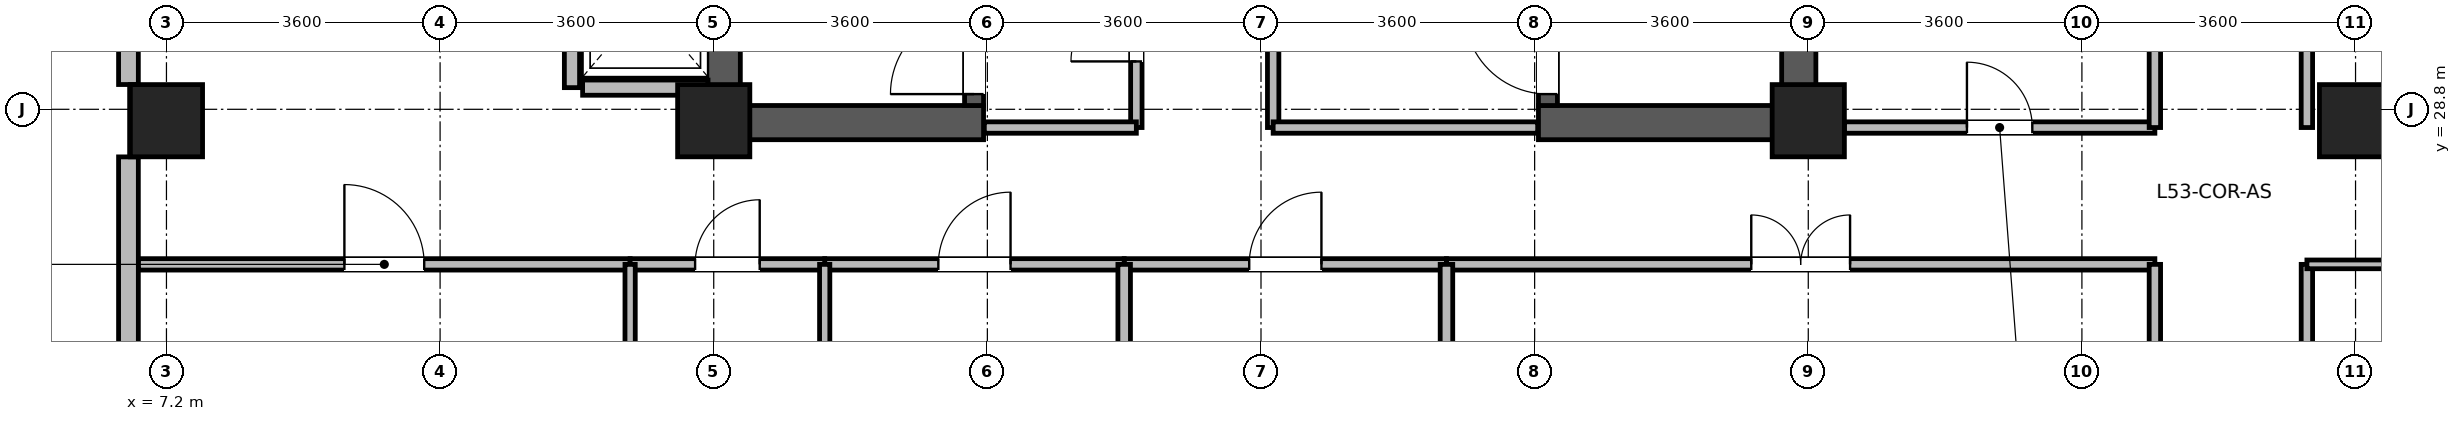
"""IFC4 building model, lengths in metres.
Left out: names, types, materials, properties, quantities, classifications, styles, units other than length and angle.
Written with IfcOpenShell. Run it as: python <this file> out.ifc"""

import sys

from ifc_helpers import new_model, si_unit, direction, frame, frame_2d, origin, origin_2d, place, context, subcontext, project, spatial, rectangle, extrude, source, transform, mapped, element, fill, save


model = new_model("IFC4")
c1 = context("Model", 3, precision=1e-05, world=origin(), true_north=direction((0.0, 1.0)))
c2 = subcontext(c1, "Body", "Model", "MODEL_VIEW")
j1 = project(units=[si_unit("LENGTHUNIT", "METRE"), si_unit("PLANEANGLEUNIT", "RADIAN")], contexts=[c1])
p1 = place(None, origin())
s1 = spatial("IfcSite", under=j1, at=p1, CompositionType="ELEMENT")
p2 = place(p1, origin())
s2 = spatial("IfcBuilding", under=s1, at=p2, CompositionType="ELEMENT")
p3 = place(p2, frame((0.0, 0.0, 209.2)))
s3 = spatial("IfcBuildingStorey", under=s2, at=p3, CompositionType="ELEMENT", Elevation=209.2)
for number, where, z_axis, x_axis in (
    (1, (14.525, 28.4, 0.0), (0.0, 0.0, 1.0), (0.0, 1.0, 0.0)),
    (2, (28.675, 28.4, 0.0), (0.0, 0.0, 1.0), (0.0, 1.0, 0.0)),
):
    element("IfcWall", number, at=place(p3, frame(where, z_axis=z_axis, x_axis=x_axis)), inside=s3, PredefinedType="SHEAR", context=c2, shape_type="SweptSolid", body=[
        extrude(rectangle(XDim=7.9, YDim=0.45, at=frame_2d((3.95, 0.0))), origin(), (0.0, 0.0, 1.0), 3.47),
    ])
for number, where, z_axis, x_axis in (
    (3, (14.75, 28.625, 0.0), (0.0, 0.0, 1.0), (1.0, 0.0, 0.0)),
    (4, (25.25, 28.625, 0.0), (0.0, 0.0, 1.0), (1.0, 0.0, 0.0)),
):
    element("IfcWall", number, at=place(p3, frame(where, z_axis=z_axis, x_axis=x_axis)), inside=s3, PredefinedType="SHEAR", context=c2, shape_type="SweptSolid", body=[
        extrude(rectangle(XDim=3.2, YDim=0.45, at=frame_2d((1.6, 0.0))), origin(), (0.0, 0.0, 1.0), 3.47),
    ])
p4 = place(p3, frame((17.825, 28.85, 0.0), z_axis=(0.0, 0.0, 1.0), x_axis=(0.0, 1.0, 0.0)))
e5 = element("IfcWall", 5, at=p4, inside=s3, PredefinedType="SHEAR", context=c2, shape_type="SweptSolid", body=[
    extrude(rectangle(XDim=7.0, YDim=0.25, at=frame_2d((3.5, 0.0))), origin(), (0.0, 0.0, 1.0), 3.47),
])
p5 = place(p4, frame((0.15, 0.0, 0.0)))
e6 = element("IfcOpeningElement", 6, at=p5, cuts=e5, PredefinedType="OPENING", context=c2, shape_type="SweptSolid", body=[
    extrude(rectangle(XDim=1.1, YDim=2.08, at=frame_2d((0.55, 1.04))), frame((0.0, 0.135, 0.0), z_axis=(0.0, -1.0, 0.0), x_axis=(1.0, 0.0, 0.0)), (0.0, 0.0, 1.0), 0.27),
])
p6 = place(p3, frame((25.375, 28.85, 0.0), z_axis=(0.0, 0.0, 1.0), x_axis=(0.0, 1.0, 0.0)))
e7 = element("IfcWall", 7, at=p6, inside=s3, PredefinedType="SHEAR", context=c2, shape_type="SweptSolid", body=[
    extrude(rectangle(XDim=7.0, YDim=0.25, at=frame_2d((3.5, 0.0))), origin(), (0.0, 0.0, 1.0), 3.47),
])
p7 = place(p6, frame((0.15, 0.0, 0.0)))
e8 = element("IfcOpeningElement", 8, at=p7, cuts=e7, PredefinedType="OPENING", context=c2, shape_type="SweptSolid", body=[
    extrude(rectangle(XDim=1.1, YDim=2.08, at=frame_2d((0.55, 1.04))), frame((0.0, 0.135, 0.0), z_axis=(0.0, -1.0, 0.0), x_axis=(1.0, 0.0, 0.0)), (0.0, 0.0, 1.0), 0.27),
])
m1 = source(origin(), c2, "Body", "SweptSolid", [
    extrude(rectangle(XDim=0.95, YDim=0.95, at=origin_2d()), origin(), (0.0, 0.0, 1.0), 3.7),
])
for number, where, z_axis, x_axis in (
    (9, (7.2, 28.65, 0.0), (0.0, 0.0, 1.0), (1.0, 0.0, 0.0)),
    (10, (14.4, 28.65, 0.0), (0.0, 0.0, 1.0), (1.0, 0.0, 0.0)),
    (11, (28.8, 28.65, 0.0), (0.0, 0.0, 1.0), (1.0, 0.0, 0.0)),
    (12, (36.0, 28.65, 0.0), (0.0, 0.0, 1.0), (1.0, 0.0, 0.0)),
):
    element("IfcColumn", number, at=place(p3, frame(where, z_axis=z_axis, x_axis=x_axis)), inside=s3, PredefinedType="COLUMN", context=c2, shape_type="MappedRepresentation", body=[
        mapped(m1, transform((0.0, 0.0, 0.0), x_axis=(1.0, 0.0, 0.0), y_axis=(0.0, 1.0, 0.0), z_axis=(0.0, 0.0, 1.0), scale=1.0)),
    ])
p8 = place(p3, frame((6.7, 29.126, 0.0), z_axis=(0.0, 0.0, 1.0), x_axis=(0.0, 1.0, 0.0)))
e13 = element("IfcWall", 13, at=p8, inside=s3, PredefinedType="STANDARD", context=c2, shape_type="SweptSolid", body=[
    extrude(rectangle(XDim=6.548, YDim=0.26, at=frame_2d((3.274, 0.0))), origin(), (0.0, 0.0, 1.0), 3.45),
])
p9 = place(p8, frame((0.737, 0.0, 0.85)))
e14 = element("IfcOpeningElement", 14, at=p9, cuts=e13, PredefinedType="OPENING", context=c2, shape_type="SweptSolid", body=[
    extrude(rectangle(XDim=1.8, YDim=1.85, at=frame_2d((0.9, 0.925))), frame((0.0, 0.14, 0.0), z_axis=(0.0, -1.0, 0.0), x_axis=(1.0, 0.0, 0.0)), (0.0, 0.0, 1.0), 0.28),
])
p10 = place(p8, frame((4.011, 0.0, 0.85)))
e15 = element("IfcOpeningElement", 15, at=p10, cuts=e13, PredefinedType="OPENING", context=c2, shape_type="SweptSolid", body=[
    extrude(rectangle(XDim=1.8, YDim=1.85, at=frame_2d((0.9, 0.925))), frame((0.0, 0.14, 0.0), z_axis=(0.0, -1.0, 0.0), x_axis=(1.0, 0.0, 0.0)), (0.0, 0.0, 1.0), 0.28),
])
p11 = place(p3, frame((6.7, 21.47, 0.0), z_axis=(0.0, 0.0, 1.0), x_axis=(0.0, 1.0, 0.0)))
e16 = element("IfcWall", 16, at=p11, inside=s3, PredefinedType="STANDARD", context=c2, shape_type="SweptSolid", body=[
    extrude(rectangle(XDim=6.704, YDim=0.26, at=frame_2d((3.352, 0.0))), origin(), (0.0, 0.0, 1.0), 3.45),
])
p12 = place(p11, frame((0.776, 0.0, 0.85)))
e17 = element("IfcOpeningElement", 17, at=p12, cuts=e16, PredefinedType="OPENING", context=c2, shape_type="SweptSolid", body=[
    extrude(rectangle(XDim=1.8, YDim=1.85, at=frame_2d((0.9, 0.925))), frame((0.0, 0.14, 0.0), z_axis=(0.0, -1.0, 0.0), x_axis=(1.0, 0.0, 0.0)), (0.0, 0.0, 1.0), 0.28),
])
p13 = place(p11, frame((2.877, 0.0, 0.85)))
e18 = element("IfcOpeningElement", 18, at=p13, cuts=e16, PredefinedType="OPENING", context=c2, shape_type="SweptSolid", body=[
    extrude(rectangle(XDim=0.95, YDim=1.75, at=frame_2d((0.475, 0.875))), frame((0.0, 0.14, 0.0), z_axis=(0.0, -1.0, 0.0), x_axis=(1.0, 0.0, 0.0)), (0.0, 0.0, 1.0), 0.28),
])
p14 = place(p3, frame((12.675, 29.085, 0.0), z_axis=(0.0, 0.0, 1.0), x_axis=(1.0, 0.0, 0.0)))
e19 = element("IfcWall", 19, at=p14, inside=s3, PredefinedType="PARTITIONING", context=c2, shape_type="SweptSolid", body=[
    extrude(rectangle(XDim=1.65, YDim=0.2, at=frame_2d((0.825, 0.0))), origin(), (0.0, 0.0, 1.0), 3.45),
])
p15 = place(p3, frame((12.535, 29.085, 0.0), z_axis=(0.0, 0.0, 1.0), x_axis=(0.0, 1.0, 0.0)))
e20 = element("IfcWall", 20, at=p15, inside=s3, PredefinedType="PARTITIONING", context=c2, shape_type="SweptSolid", body=[
    extrude(rectangle(XDim=2.23, YDim=0.2, at=frame_2d((1.115, 0.0))), origin(), (0.0, 0.0, 1.0), 3.45),
])
p16 = place(p3, frame((35.36, 16.96, 0.0), z_axis=(0.0, 0.0, 1.0), x_axis=(0.0, 1.0, 0.0)))
e21 = element("IfcWall", 21, at=p16, inside=s3, PredefinedType="PARTITIONING", context=c2, shape_type="SweptSolid", body=[
    extrude(rectangle(XDim=9.8, YDim=0.15, at=frame_2d((4.9, 0.0))), origin(), (0.0, 0.0, 1.0), 3.45),
])
p17 = place(p16, frame((2.486, 0.0, 0.0)))
e22 = element("IfcOpeningElement", 22, at=p17, cuts=e21, PredefinedType="OPENING", context=c2, shape_type="SweptSolid", body=[
    extrude(rectangle(XDim=1.3, YDim=2.12, at=frame_2d((0.65, 1.06))), frame((0.0, 0.085, 0.0), z_axis=(0.0, -1.0, 0.0), x_axis=(1.0, 0.0, 0.0)), (0.0, 0.0, 1.0), 0.17),
])
p18 = place(p3, frame((24.04, 26.76, 0.0), z_axis=(0.0, 0.0, 1.0), x_axis=(1.0, 0.0, 0.0)))
e23 = element("IfcWall", 23, at=p18, inside=s3, PredefinedType="PARTITIONING", context=c2, shape_type="SweptSolid", body=[
    extrude(rectangle(XDim=9.32, YDim=0.15, at=frame_2d((4.66, 0.0))), origin(), (0.0, 0.0, 1.0), 3.45),
])
p19 = place(p18, frame((4.01, 0.0, 0.0)))
e24 = element("IfcOpeningElement", 24, at=p19, cuts=e23, PredefinedType="OPENING", context=c2, shape_type="SweptSolid", body=[
    extrude(rectangle(XDim=1.3, YDim=2.12, at=frame_2d((0.65, 1.06))), frame((0.0, 0.085, 0.0), z_axis=(0.0, -1.0, 0.0), x_axis=(1.0, 0.0, 0.0)), (0.0, 0.0, 1.0), 0.17),
])
p20 = place(p3, frame((35.36, 28.56, 0.0), z_axis=(0.0, 0.0, 1.0), x_axis=(0.0, 1.0, 0.0)))
e25 = element("IfcWall", 25, at=p20, inside=s3, PredefinedType="PARTITIONING", context=c2, shape_type="SweptSolid", body=[
    extrude(rectangle(XDim=7.68, YDim=0.15, at=frame_2d((3.84, 0.0))), origin(), (0.0, 0.0, 1.0), 3.45),
])
p21 = place(p20, frame((3.19, 0.0, 0.0)))
e26 = element("IfcOpeningElement", 26, at=p21, cuts=e25, PredefinedType="OPENING", context=c2, shape_type="SweptSolid", body=[
    extrude(rectangle(XDim=1.3, YDim=2.12, at=frame_2d((0.65, 1.06))), frame((0.0, 0.085, 0.0), z_axis=(0.0, -1.0, 0.0), x_axis=(1.0, 0.0, 0.0)), (0.0, 0.0, 1.0), 0.17),
])
p22 = place(p3, frame((6.832, 26.76, 0.0), z_axis=(0.0, 0.0, 1.0), x_axis=(1.0, 0.0, 0.0)))
e27 = element("IfcWall", 27, at=p22, inside=s3, PredefinedType="PARTITIONING", context=c2, shape_type="SweptSolid", body=[
    extrude(rectangle(XDim=6.468, YDim=0.15, at=frame_2d((3.234, 0.0))), origin(), (0.0, 0.0, 1.0), 3.45),
])
p23 = place(p22, frame((2.709, 0.0, 0.0)))
e28 = element("IfcOpeningElement", 28, at=p23, cuts=e27, PredefinedType="OPENING", context=c2, shape_type="SweptSolid", body=[
    extrude(rectangle(XDim=1.05, YDim=2.12, at=frame_2d((0.525, 1.06))), frame((0.0, 0.085, 0.0), z_axis=(0.0, -1.0, 0.0), x_axis=(1.0, 0.0, 0.0)), (0.0, 0.0, 1.0), 0.17),
])
p24 = place(p3, frame((33.36, 21.6, 0.0), z_axis=(0.0, 0.0, 1.0), x_axis=(0.0, 1.0, 0.0)))
e29 = element("IfcWall", 29, at=p24, inside=s3, PredefinedType="PARTITIONING", context=c2, shape_type="SweptSolid", body=[
    extrude(rectangle(XDim=5.16, YDim=0.15, at=frame_2d((2.58, 0.0))), origin(), (0.0, 0.0, 1.0), 3.45),
])
p25 = place(p3, frame((29.275, 28.56, 0.0), z_axis=(0.0, 0.0, 1.0), x_axis=(1.0, 0.0, 0.0)))
e30 = element("IfcWall", 30, at=p25, inside=s3, PredefinedType="PARTITIONING", context=c2, shape_type="SweptSolid", body=[
    extrude(rectangle(XDim=4.085, YDim=0.15, at=frame_2d((2.042, 0.0))), origin(), (0.0, 0.0, 1.0), 2.85),
])
p26 = place(p25, frame((1.613, 0.0, 0.0)))
e31 = element("IfcOpeningElement", 31, at=p26, cuts=e30, PredefinedType="OPENING", context=c2, shape_type="SweptSolid", body=[
    extrude(rectangle(XDim=0.86, YDim=2.02, at=frame_2d((0.43, 1.01))), frame((0.0, 0.085, 0.0), z_axis=(0.0, -1.0, 0.0), x_axis=(1.0, 0.0, 0.0)), (0.0, 0.0, 1.0), 0.17),
])
p27 = place(p3, frame((19.8, 26.76, 0.0), z_axis=(0.0, 0.0, 1.0), x_axis=(1.0, 0.0, 0.0)))
e32 = element("IfcWall", 32, at=p27, inside=s3, PredefinedType="PARTITIONING", context=c2, shape_type="SweptSolid", body=[
    extrude(rectangle(XDim=4.24, YDim=0.15, at=frame_2d((2.12, 0.0))), origin(), (0.0, 0.0, 1.0), 3.45),
])
p28 = place(p27, frame((1.645, 0.0, 0.0)))
e33 = element("IfcOpeningElement", 33, at=p28, cuts=e32, PredefinedType="OPENING", context=c2, shape_type="SweptSolid", body=[
    extrude(rectangle(XDim=0.95, YDim=2.1, at=frame_2d((0.475, 1.05))), frame((0.0, 0.085, 0.0), z_axis=(0.0, -1.0, 0.0), x_axis=(1.0, 0.0, 0.0)), (0.0, 0.0, 1.0), 0.17),
])
p29 = place(p3, frame((15.86, 26.76, 0.0), z_axis=(0.0, 0.0, 1.0), x_axis=(1.0, 0.0, 0.0)))
e34 = element("IfcWall", 34, at=p29, inside=s3, PredefinedType="PARTITIONING", context=c2, shape_type="SweptSolid", body=[
    extrude(rectangle(XDim=3.94, YDim=0.15, at=frame_2d((1.97, 0.0))), origin(), (0.0, 0.0, 1.0), 3.45),
])
p30 = place(p29, frame((1.495, 0.0, 0.0)))
e35 = element("IfcOpeningElement", 35, at=p30, cuts=e34, PredefinedType="OPENING", context=c2, shape_type="SweptSolid", body=[
    extrude(rectangle(XDim=0.95, YDim=2.1, at=frame_2d((0.475, 1.05))), frame((0.0, 0.085, 0.0), z_axis=(0.0, -1.0, 0.0), x_axis=(1.0, 0.0, 0.0)), (0.0, 0.0, 1.0), 0.17),
])
p31 = place(p3, frame((33.36, 28.56, 0.0), z_axis=(0.0, 0.0, 1.0), x_axis=(0.0, 1.0, 0.0)))
e36 = element("IfcWall", 36, at=p31, inside=s3, PredefinedType="PARTITIONING", context=c2, shape_type="SweptSolid", body=[
    extrude(rectangle(XDim=3.84, YDim=0.15, at=frame_2d((1.92, 0.0))), origin(), (0.0, 0.0, 1.0), 3.45),
])
p32 = place(p3, frame((19.96, 28.56, 0.0), z_axis=(0.0, 0.0, 1.0), x_axis=(0.0, 1.0, 0.0)))
e37 = element("IfcWall", 37, at=p32, inside=s3, PredefinedType="PARTITIONING", context=c2, shape_type="SweptSolid", body=[
    extrude(rectangle(XDim=2.6, YDim=0.15, at=frame_2d((1.3, 0.0))), origin(), (0.0, 0.0, 1.0), 3.45),
])
p33 = place(p32, frame((0.87, 0.0, 0.0)))
e38 = element("IfcOpeningElement", 38, at=p33, cuts=e37, PredefinedType="OPENING", context=c2, shape_type="SweptSolid", body=[
    extrude(rectangle(XDim=0.86, YDim=2.02, at=frame_2d((0.43, 1.01))), frame((0.0, 0.085, 0.0), z_axis=(0.0, -1.0, 0.0), x_axis=(1.0, 0.0, 0.0)), (0.0, 0.0, 1.0), 0.17),
])
p34 = place(p3, frame((13.3, 26.76, 0.0), z_axis=(0.0, 0.0, 1.0), x_axis=(1.0, 0.0, 0.0)))
e39 = element("IfcWall", 39, at=p34, inside=s3, PredefinedType="PARTITIONING", context=c2, shape_type="SweptSolid", body=[
    extrude(rectangle(XDim=2.56, YDim=0.15, at=frame_2d((1.28, 0.0))), origin(), (0.0, 0.0, 1.0), 3.45),
])
p35 = place(p34, frame((0.855, 0.0, 0.0)))
e40 = element("IfcOpeningElement", 40, at=p35, cuts=e39, PredefinedType="OPENING", context=c2, shape_type="SweptSolid", body=[
    extrude(rectangle(XDim=0.85, YDim=2.04, at=frame_2d((0.425, 1.02))), frame((0.0, 0.085, 0.0), z_axis=(0.0, -1.0, 0.0), x_axis=(1.0, 0.0, 0.0)), (0.0, 0.0, 1.0), 0.17),
])
p36 = place(p3, frame((17.96, 28.56, 0.0), z_axis=(0.0, 0.0, 1.0), x_axis=(1.0, 0.0, 0.0)))
e41 = element("IfcWall", 41, at=p36, inside=s3, PredefinedType="PARTITIONING", context=c2, shape_type="SweptSolid", body=[
    extrude(rectangle(XDim=2.0, YDim=0.15, at=frame_2d((1.0, 0.0))), origin(), (0.0, 0.0, 1.0), 2.45),
])
p37 = place(p3, frame((35.36, 26.76, 0.0), z_axis=(0.0, 0.0, 1.0), x_axis=(1.0, 0.0, 0.0)))
e42 = element("IfcWall", 42, at=p37, inside=s3, PredefinedType="PARTITIONING", context=c2, shape_type="SweptSolid", body=[
    extrude(rectangle(XDim=9.16, YDim=0.115, at=frame_2d((4.58, 0.0))), origin(), (0.0, 0.0, 1.0), 3.45),
])
p38 = place(p3, frame((15.86, 21.732, 0.0), z_axis=(0.0, 0.0, 1.0), x_axis=(0.0, 1.0, 0.0)))
e43 = element("IfcWall", 43, at=p38, inside=s3, PredefinedType="PARTITIONING", context=c2, shape_type="SweptSolid", body=[
    extrude(rectangle(XDim=5.028, YDim=0.135, at=frame_2d((2.514, 0.0))), origin(), (0.0, 0.0, 1.0), 3.45),
])
for number, where, z_axis, x_axis in (
    (44, (19.8, 21.732, 0.0), (0.0, 0.0, 1.0), (0.0, 1.0, 0.0)),
    (45, (24.04, 21.732, 0.0), (0.0, 0.0, 1.0), (0.0, 1.0, 0.0)),
):
    element("IfcWall", number, at=place(p3, frame(where, z_axis=z_axis, x_axis=x_axis)), inside=s3, PredefinedType="PARTITIONING", context=c2, shape_type="SweptSolid", body=[
        extrude(rectangle(XDim=5.028, YDim=0.165, at=frame_2d((2.514, 0.0))), origin(), (0.0, 0.0, 1.0), 3.45),
    ])
p39 = place(p3, frame((21.76, 28.56, 0.0), z_axis=(0.0, 0.0, 1.0), x_axis=(0.0, 1.0, 0.0)))
e46 = element("IfcWall", 46, at=p39, inside=s3, PredefinedType="PARTITIONING", context=c2, shape_type="SweptSolid", body=[
    extrude(rectangle(XDim=4.6, YDim=0.15, at=frame_2d((2.3, 0.0))), origin(), (0.0, 0.0, 1.0), 3.45),
])
p40 = place(p39, frame((1.55, 0.0, 0.0)))
e47 = element("IfcOpeningElement", 47, at=p40, cuts=e46, PredefinedType="OPENING", context=c2, shape_type="SweptSolid", body=[
    extrude(rectangle(XDim=1.5, YDim=2.1, at=frame_2d((0.75, 1.05))), frame((0.0, 0.085, 0.0), z_axis=(0.0, -1.0, 0.0), x_axis=(1.0, 0.0, 0.0)), (0.0, 0.0, 1.0), 0.17),
])
p41 = place(p3, frame((21.76, 28.56, 0.0), z_axis=(0.0, 0.0, 1.0), x_axis=(1.0, 0.0, 0.0)))
e48 = element("IfcWall", 48, at=p41, inside=s3, PredefinedType="PARTITIONING", context=c2, shape_type="SweptSolid", body=[
    extrude(rectangle(XDim=3.48, YDim=0.15, at=frame_2d((1.74, 0.0))), origin(), (0.0, 0.0, 1.0), 2.45),
])
p42 = place(p3, frame((13.3, 23.5, 0.0), z_axis=(0.0, 0.0, 1.0), x_axis=(0.0, 1.0, 0.0)))
e49 = element("IfcWall", 49, at=p42, inside=s3, PredefinedType="PARTITIONING", context=c2, shape_type="SweptSolid", body=[
    extrude(rectangle(XDim=3.26, YDim=0.135, at=frame_2d((1.63, 0.0))), origin(), (0.0, 0.0, 1.0), 3.45),
])
p43 = place(p5, origin())
e50 = element("IfcDoor", 50, at=p43, inside=s3, OperationType="SINGLE_SWING_LEFT", PredefinedType="DOOR", context=c2, shape_type="SweptSolid", body=[
    extrude(rectangle(XDim=1.1, YDim=2.08, at=frame_2d((0.55, 1.04))), frame((0.0, 0.025, 0.0), z_axis=(0.0, -1.0, 0.0), x_axis=(1.0, 0.0, 0.0)), (0.0, 0.0, 1.0), 0.05),
])
fill(e6, e50)
p44 = place(p7, origin())
e51 = element("IfcDoor", 51, at=p44, inside=s3, OperationType="SINGLE_SWING_RIGHT", PredefinedType="DOOR", context=c2, shape_type="SweptSolid", body=[
    extrude(rectangle(XDim=1.1, YDim=2.08, at=frame_2d((0.55, 1.04))), frame((0.0, 0.025, 0.0), z_axis=(0.0, -1.0, 0.0), x_axis=(1.0, 0.0, 0.0)), (0.0, 0.0, 1.0), 0.05),
])
fill(e8, e51)
p45 = place(p19, origin())
e52 = element("IfcDoor", 52, at=p45, inside=s3, OperationType="DOUBLE_DOOR_SINGLE_SWING", PredefinedType="DOOR", context=c2, shape_type="SweptSolid", body=[
    extrude(rectangle(XDim=1.3, YDim=2.12, at=frame_2d((0.65, 1.06))), frame((0.0, 0.025, 0.0), z_axis=(0.0, -1.0, 0.0), x_axis=(1.0, 0.0, 0.0)), (0.0, 0.0, 1.0), 0.05),
])
fill(e24, e52)
p46 = place(p23, origin())
e53 = element("IfcDoor", 53, at=p46, inside=s3, OperationType="SINGLE_SWING_LEFT", PredefinedType="DOOR", context=c2, shape_type="SweptSolid", body=[
    extrude(rectangle(XDim=1.05, YDim=2.12, at=frame_2d((0.525, 1.06))), frame((0.0, 0.025, 0.0), z_axis=(0.0, -1.0, 0.0), x_axis=(1.0, 0.0, 0.0)), (0.0, 0.0, 1.0), 0.05),
])
fill(e28, e53)
p47 = place(p26, origin())
e54 = element("IfcDoor", 54, at=p47, inside=s3, OperationType="SINGLE_SWING_LEFT", PredefinedType="DOOR", context=c2, shape_type="SweptSolid", body=[
    extrude(rectangle(XDim=0.86, YDim=2.02, at=frame_2d((0.43, 1.01))), frame((0.0, 0.025, 0.0), z_axis=(0.0, -1.0, 0.0), x_axis=(1.0, 0.0, 0.0)), (0.0, 0.0, 1.0), 0.05),
])
fill(e31, e54)
p48 = place(p28, origin())
e55 = element("IfcDoor", 55, at=p48, inside=s3, OperationType="SINGLE_SWING_RIGHT", PredefinedType="DOOR", context=c2, shape_type="SweptSolid", body=[
    extrude(rectangle(XDim=0.95, YDim=2.1, at=frame_2d((0.475, 1.05))), frame((0.0, 0.025, 0.0), z_axis=(0.0, -1.0, 0.0), x_axis=(1.0, 0.0, 0.0)), (0.0, 0.0, 1.0), 0.05),
])
fill(e33, e55)
p49 = place(p30, origin())
e56 = element("IfcDoor", 56, at=p49, inside=s3, OperationType="SINGLE_SWING_RIGHT", PredefinedType="DOOR", context=c2, shape_type="SweptSolid", body=[
    extrude(rectangle(XDim=0.95, YDim=2.1, at=frame_2d((0.475, 1.05))), frame((0.0, 0.025, 0.0), z_axis=(0.0, -1.0, 0.0), x_axis=(1.0, 0.0, 0.0)), (0.0, 0.0, 1.0), 0.05),
])
fill(e35, e56)
p50 = place(p33, origin())
e57 = element("IfcDoor", 57, at=p50, inside=s3, OperationType="SINGLE_SWING_LEFT", PredefinedType="DOOR", context=c2, shape_type="SweptSolid", body=[
    extrude(rectangle(XDim=0.86, YDim=2.02, at=frame_2d((0.43, 1.01))), frame((0.0, 0.025, 0.0), z_axis=(0.0, -1.0, 0.0), x_axis=(1.0, 0.0, 0.0)), (0.0, 0.0, 1.0), 0.05),
])
fill(e38, e57)
p51 = place(p35, origin())
e58 = element("IfcDoor", 58, at=p51, inside=s3, OperationType="SINGLE_SWING_RIGHT", PredefinedType="DOOR", context=c2, shape_type="SweptSolid", body=[
    extrude(rectangle(XDim=0.85, YDim=2.04, at=frame_2d((0.425, 1.02))), frame((0.0, 0.025, 0.0), z_axis=(0.0, -1.0, 0.0), x_axis=(1.0, 0.0, 0.0)), (0.0, 0.0, 1.0), 0.05),
])
fill(e40, e58)
save(model, sys.argv[1])
